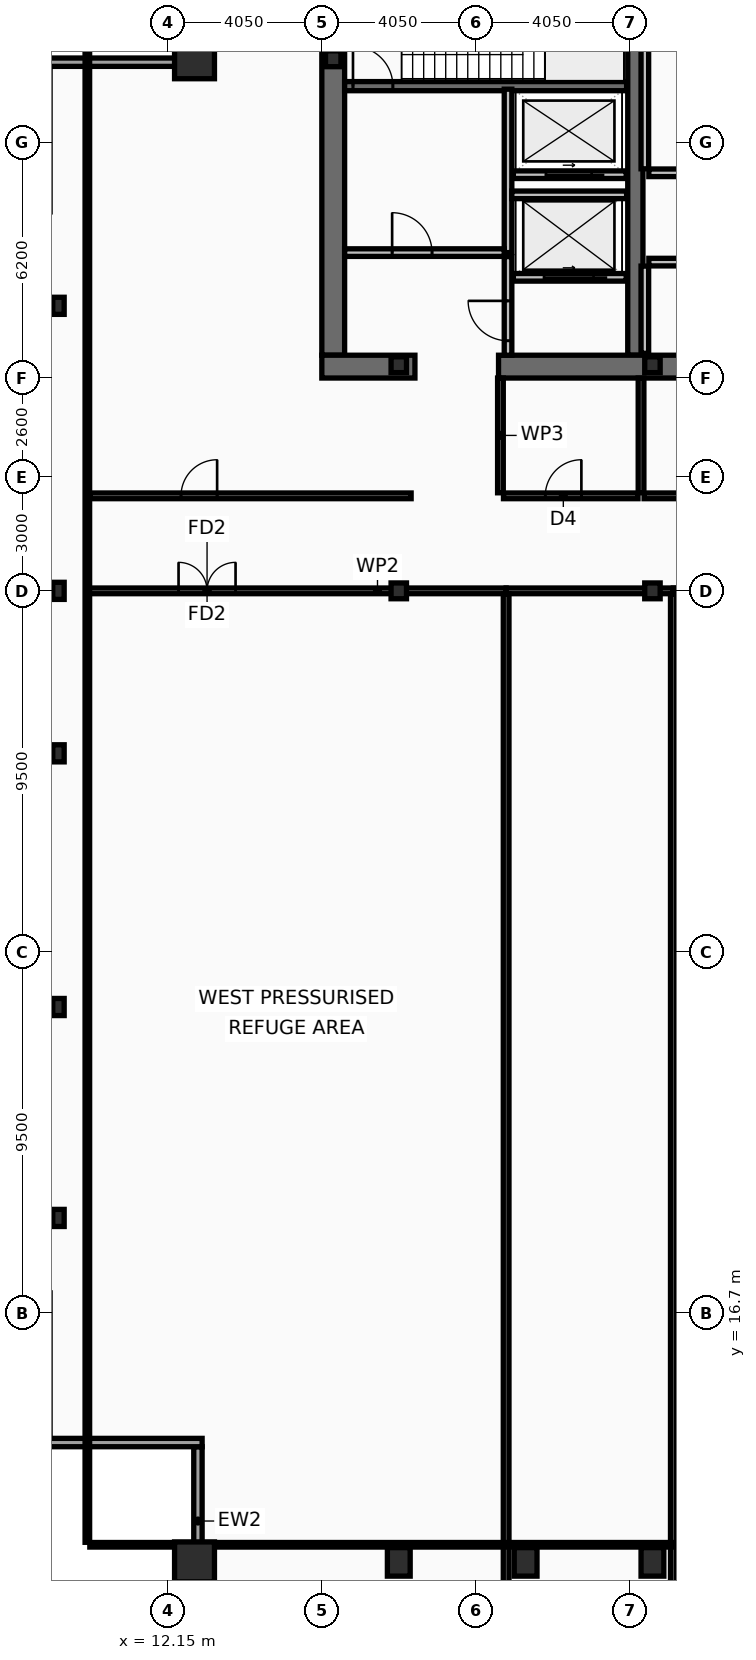
"""IFC4 building model, lengths in metres.
Left out: names, types, materials, properties, quantities, classifications, styles, units other than length and angle.
Written with IfcOpenShell. Run it as: python <this file> out.ifc"""

import sys

from ifc_helpers import new_model, si_unit, direction, frame, frame_2d, origin, origin_2d, place, context, subcontext, project, spatial, rectangle, hollow_rectangle, i_section, extrude, element, fill, save


model = new_model("IFC4")
c1 = context("Model", 3, precision=1e-05, world=origin(), true_north=direction((0.0, 1.0)))
c2 = subcontext(c1, "Body", "Model", "MODEL_VIEW")
j1 = project(units=[si_unit("LENGTHUNIT", "METRE"), si_unit("PLANEANGLEUNIT", "RADIAN")], contexts=[c1])
p1 = place(None, origin())
s1 = spatial("IfcSite", under=j1, at=p1, CompositionType="ELEMENT")
p2 = place(p1, origin())
s2 = spatial("IfcBuilding", under=s1, at=p2, CompositionType="ELEMENT")
p3 = place(p2, frame((0.0, 0.0, 257.0)))
s3 = spatial("IfcBuildingStorey", under=s2, at=p3, CompositionType="ELEMENT", Elevation=257.0)
p4 = place(p3, frame((16.5, 41.9, 0.0), z_axis=(0.0, 0.0, 1.0), x_axis=(0.0, 1.0, 0.0)))
e1 = element("IfcWall", 1, at=p4, inside=s3, PredefinedType="SHEAR", context=c2, shape_type="SweptSolid", body=[
    extrude(rectangle(XDim=11.2, YDim=0.6, at=frame_2d((5.6, 0.0))), origin(), (0.0, 0.0, 1.0), 4.64),
])
p5 = place(p3, frame((24.45, 41.9, 0.0), z_axis=(0.0, 0.0, 1.0), x_axis=(0.0, 1.0, 0.0)))
e2 = element("IfcWall", 2, at=p5, inside=s3, PredefinedType="SHEAR", context=c2, shape_type="SweptSolid", body=[
    extrude(rectangle(XDim=11.2, YDim=0.4, at=frame_2d((5.6, 0.0))), origin(), (0.0, 0.0, 1.0), 4.64),
])
p6 = place(p3, frame((18.65, 41.6, 0.0), z_axis=(0.0, 0.0, 1.0), x_axis=(-1.0, 0.0, 0.0)))
e3 = element("IfcWall", 3, at=p6, inside=s3, PredefinedType="SHEAR", context=c2, shape_type="SweptSolid", body=[
    extrude(rectangle(XDim=2.45, YDim=0.6, at=frame_2d((1.225, 0.0))), origin(), (0.0, 0.0, 1.0), 4.64),
])
p7 = place(p3, frame((32.3, 41.6, 0.0), z_axis=(0.0, 0.0, 1.0), x_axis=(-1.0, 0.0, 0.0)))
e4 = element("IfcWall", 4, at=p7, inside=s3, PredefinedType="SHEAR", context=c2, shape_type="SweptSolid", body=[
    extrude(rectangle(XDim=11.45, YDim=0.6, at=frame_2d((5.725, 0.0))), origin(), (0.0, 0.0, 1.0), 4.64),
])
p8 = place(p3, frame((16.8, 48.98, 0.0), z_axis=(0.0, 0.0, 1.0), x_axis=(1.0, 0.0, 0.0)))
e5 = element("IfcWall", 5, at=p8, inside=s3, PredefinedType="SHEAR", context=c2, shape_type="SweptSolid", body=[
    extrude(rectangle(XDim=7.42, YDim=0.24, at=frame_2d((3.71, 0.0))), origin(), (0.0, 0.0, 1.0), 4.64),
])
p9 = place(p8, frame((0.22, 0.0, 0.0)))
e6 = element("IfcOpeningElement", 6, at=p9, cuts=e5, PredefinedType="OPENING", context=c2, shape_type="SweptSolid", body=[
    extrude(rectangle(XDim=1.05, YDim=2.15, at=frame_2d((0.525, 1.075))), frame((0.0, 0.13, 0.0), z_axis=(0.0, -1.0, 0.0), x_axis=(1.0, 0.0, 0.0)), (0.0, 0.0, 1.0), 0.26),
])
for number, where, z_axis, x_axis in (
    (7, (12.85, 10.15, 0.0), (0.0, 0.0, 1.0), (1.0, 0.0, 0.0)),
    (8, (12.85, 49.7, 0.0), (0.0, 0.0, 1.0), (1.0, 0.0, 0.0)),
):
    element("IfcColumn", number, at=place(p3, frame(where, z_axis=z_axis, x_axis=x_axis)), inside=s3, PredefinedType="COLUMN", context=c2, shape_type="SweptSolid", body=[
        extrude(hollow_rectangle(XDim=1.05, YDim=1.05, WallThickness=0.055, at=origin_2d()), origin(), (0.0, 0.0, 1.0), 4.8),
    ])
for number, where, z_axis, x_axis in (
    (9, (18.225, 10.15, 0.0), (0.0, 0.0, 1.0), (1.0, 0.0, 0.0)),
    (10, (21.562, 10.15, 0.0), (0.0, 0.0, 1.0), (1.0, 0.0, 0.0)),
    (11, (24.9, 10.15, 0.0), (0.0, 0.0, 1.0), (1.0, 0.0, 0.0)),
):
    element("IfcColumn", number, at=place(p3, frame(where, z_axis=z_axis, x_axis=x_axis)), inside=s3, PredefinedType="COLUMN", context=c2, shape_type="SweptSolid", body=[
        extrude(hollow_rectangle(XDim=0.6, YDim=0.75, WallThickness=0.045, at=origin_2d()), origin(), (0.0, 0.0, 1.0), 4.8),
    ])
for number, where, z_axis, x_axis in (
    (12, (9.27, 19.2, 0.0), (0.0, 0.0, 1.0), (1.0, 0.0, 0.0)),
    (13, (9.27, 24.75, 0.0), (0.0, 0.0, 1.0), (1.0, 0.0, 0.0)),
    (14, (9.27, 31.425, 0.0), (0.0, 0.0, 1.0), (1.0, 0.0, 0.0)),
    (15, (9.27, 35.7, 0.0), (0.0, 0.0, 1.0), (1.0, 0.0, 0.0)),
    (16, (9.27, 43.2, 0.0), (0.0, 0.0, 1.0), (1.0, 0.0, 0.0)),
):
    element("IfcColumn", number, at=place(p3, frame(where, z_axis=z_axis, x_axis=x_axis)), inside=s3, PredefinedType="COLUMN", context=c2, shape_type="SweptSolid", body=[
        extrude(i_section(OverallWidth=0.3, OverallDepth=0.45, WebThickness=0.014, FlangeThickness=0.026, at=origin_2d()), origin(), (0.0, 0.0, 1.0), 4.8),
    ])
for number, where, z_axis, x_axis in (
    (17, (16.5, 49.7, 0.0), (0.0, 0.0, 1.0), (1.0, 0.0, 0.0)),
    (18, (18.225, 35.7, 0.0), (0.0, 0.0, 1.0), (1.0, 0.0, 0.0)),
    (19, (18.225, 41.65, 0.0), (0.0, 0.0, 1.0), (1.0, 0.0, 0.0)),
    (20, (24.9, 35.7, 0.0), (0.0, 0.0, 1.0), (1.0, 0.0, 0.0)),
    (21, (24.9, 41.65, 0.0), (0.0, 0.0, 1.0), (1.0, 0.0, 0.0)),
):
    element("IfcColumn", number, at=place(p3, frame(where, z_axis=z_axis, x_axis=x_axis)), inside=s3, PredefinedType="COLUMN", context=c2, shape_type="SweptSolid", body=[
        extrude(i_section(OverallWidth=0.406, OverallDepth=0.416, WebThickness=0.03, FlangeThickness=0.048, at=origin_2d()), origin(), (0.0, 0.0, 1.0), 4.8),
    ])
p10 = place(p3, frame((12.94, 9.27, 0.0), z_axis=(0.0, 0.0, 1.0), x_axis=(0.0, 1.0, 0.0)))
e22 = element("IfcWall", 22, at=p10, inside=s3, PredefinedType="SOLIDWALL", context=c2, shape_type="SweptSolid", body=[
    extrude(rectangle(XDim=3.91, YDim=0.22, at=frame_2d((1.955, 0.0))), origin(), (0.0, 0.0, 1.0), 4.03),
])
for number, where, z_axis, x_axis in (
    (23, (13.05, 13.29, 0.0), (0.0, 0.0, 1.0), (-1.0, 0.0, 0.0)),
    (24, (8.83, 49.61, 0.0), (0.0, 0.0, 1.0), (1.0, 0.0, 0.0)),
):
    element("IfcWall", number, at=place(p3, frame(where, z_axis=z_axis, x_axis=x_axis)), inside=s3, PredefinedType="SOLIDWALL", context=c2, shape_type="SweptSolid", body=[
        extrude(rectangle(XDim=4.22, YDim=0.22, at=frame_2d((2.11, 0.0))), origin(), (0.0, 0.0, 1.0), 4.03),
    ])
p11 = place(p3, frame((12.94, 49.72, 0.0), z_axis=(0.0, 0.0, 1.0), x_axis=(0.0, 1.0, 0.0)))
e25 = element("IfcWall", 25, at=p11, inside=s3, PredefinedType="SOLIDWALL", context=c2, shape_type="SweptSolid", body=[
    extrude(rectangle(XDim=3.91, YDim=0.22, at=frame_2d((1.955, 0.0))), origin(), (0.0, 0.0, 1.0), 4.03),
])
p12 = place(p3, frame((24.21, 43.95, 0.0), z_axis=(0.0, 0.0, 1.0), x_axis=(-1.0, 0.0, 0.0)))
e26 = element("IfcWall", 26, at=p12, inside=s3, PredefinedType="PARTITIONING", context=c2, shape_type="SweptSolid", body=[
    extrude(rectangle(XDim=2.97, YDim=0.2, at=frame_2d((1.485, 0.0))), origin(), (0.0, 0.0, 1.0), 4.64),
])
p13 = place(p12, frame((0.86, 0.0, 0.0)))
e27 = element("IfcOpeningElement", 27, at=p13, cuts=e26, PredefinedType="OPENING", context=c2, shape_type="SweptSolid", body=[
    extrude(rectangle(XDim=1.3, YDim=2.18, at=frame_2d((0.65, 1.09))), frame((0.0, 0.11, 0.0), z_axis=(0.0, -1.0, 0.0), x_axis=(1.0, 0.0, 0.0)), (0.0, 0.0, 1.0), 0.22),
])
p14 = place(p3, frame((24.21, 46.65, 0.0), z_axis=(0.0, 0.0, 1.0), x_axis=(-1.0, 0.0, 0.0)))
e28 = element("IfcWall", 28, at=p14, inside=s3, PredefinedType="PARTITIONING", context=c2, shape_type="SweptSolid", body=[
    extrude(rectangle(XDim=2.97, YDim=0.2, at=frame_2d((1.485, 0.0))), origin(), (0.0, 0.0, 1.0), 4.64),
])
p15 = place(p14, frame((0.91, 0.0, 0.0)))
e29 = element("IfcOpeningElement", 29, at=p15, cuts=e28, PredefinedType="OPENING", context=c2, shape_type="SweptSolid", body=[
    extrude(rectangle(XDim=1.2, YDim=2.18, at=frame_2d((0.6, 1.09))), frame((0.0, 0.11, 0.0), z_axis=(0.0, -1.0, 0.0), x_axis=(1.0, 0.0, 0.0)), (0.0, 0.0, 1.0), 0.22),
])
p16 = place(p3, frame((21.1, 44.6, 0.0), z_axis=(0.0, 0.0, 1.0), x_axis=(0.0, 1.0, 0.0)))
e30 = element("IfcWall", 30, at=p16, inside=s3, PredefinedType="PARTITIONING", context=c2, shape_type="SweptSolid", body=[
    extrude(rectangle(XDim=4.3, YDim=0.2, at=frame_2d((2.15, 0.0))), origin(), (0.0, 0.0, 1.0), 4.64),
])
p17 = place(p3, frame((16.8, 44.6, 0.0), z_axis=(0.0, 0.0, 1.0), x_axis=(1.0, 0.0, 0.0)))
e31 = element("IfcWall", 31, at=p17, inside=s3, PredefinedType="PARTITIONING", context=c2, shape_type="SweptSolid", body=[
    extrude(rectangle(XDim=4.2, YDim=0.2, at=frame_2d((2.1, 0.0))), origin(), (0.0, 0.0, 1.0), 4.64),
])
p18 = place(p17, frame((1.25, 0.0, 0.0)))
e32 = element("IfcOpeningElement", 32, at=p18, cuts=e31, PredefinedType="OPENING", context=c2, shape_type="SweptSolid", body=[
    extrude(rectangle(XDim=1.05, YDim=2.15, at=frame_2d((0.525, 1.075))), frame((0.0, 0.11, 0.0), z_axis=(0.0, -1.0, 0.0), x_axis=(1.0, 0.0, 0.0)), (0.0, 0.0, 1.0), 0.22),
])
p19 = place(p3, frame((21.2, 46.12, 0.0), z_axis=(0.0, 0.0, 1.0), x_axis=(1.0, 0.0, 0.0)))
e33 = element("IfcWall", 33, at=p19, inside=s3, PredefinedType="PARTITIONING", context=c2, shape_type="SweptSolid", body=[
    extrude(rectangle(XDim=3.02, YDim=0.2, at=frame_2d((1.51, 0.0))), origin(), (0.0, 0.0, 1.0), 4.64),
])
p20 = place(p3, frame((21.1, 41.9, 0.0), z_axis=(0.0, 0.0, 1.0), x_axis=(0.0, 1.0, 0.0)))
e34 = element("IfcWall", 34, at=p20, inside=s3, PredefinedType="PARTITIONING", context=c2, shape_type="SweptSolid", body=[
    extrude(rectangle(XDim=2.595, YDim=0.2, at=frame_2d((1.298, 0.0))), origin(), (0.0, 0.0, 1.0), 4.64),
])
p21 = place(p20, frame((0.38, 0.0, 0.0)))
e35 = element("IfcOpeningElement", 35, at=p21, cuts=e34, PredefinedType="OPENING", context=c2, shape_type="SweptSolid", body=[
    extrude(rectangle(XDim=1.05, YDim=2.15, at=frame_2d((0.525, 1.075))), frame((0.0, 0.11, 0.0), z_axis=(0.0, -1.0, 0.0), x_axis=(1.0, 0.0, 0.0)), (0.0, 0.0, 1.0), 0.22),
])
p22 = place(p3, frame((24.7, 46.805, 0.0), z_axis=(0.0, 0.0, 1.0), x_axis=(0.0, 1.0, 0.0)))
e36 = element("IfcWall", 36, at=p22, inside=s3, PredefinedType="PARTITIONING", context=c2, shape_type="SweptSolid", body=[
    extrude(rectangle(XDim=5.99, YDim=0.2, at=frame_2d((2.995, 0.0))), origin(), (0.0, 0.0, 1.0), 4.64),
])
p23 = place(p3, frame((24.805, 46.7, 0.0), z_axis=(0.0, 0.0, 1.0), x_axis=(1.0, 0.0, 0.0)))
e37 = element("IfcWall", 37, at=p23, inside=s3, PredefinedType="PARTITIONING", context=c2, shape_type="SweptSolid", body=[
    extrude(rectangle(XDim=7.51, YDim=0.2, at=frame_2d((3.755, 0.0))), origin(), (0.0, 0.0, 1.0), 4.64),
])
p24 = place(p23, frame((2.4, 0.0, 0.0)))
e38 = element("IfcOpeningElement", 38, at=p24, cuts=e37, PredefinedType="OPENING", context=c2, shape_type="SweptSolid", body=[
    extrude(rectangle(XDim=0.95, YDim=2.1, at=frame_2d((0.475, 1.05))), frame((0.0, 0.11, 0.0), z_axis=(0.0, -1.0, 0.0), x_axis=(1.0, 0.0, 0.0)), (0.0, 0.0, 1.0), 0.22),
])
p25 = place(p3, frame((24.7, 41.95, 0.0), z_axis=(0.0, 0.0, 1.0), x_axis=(0.0, 1.0, 0.0)))
e39 = element("IfcWall", 39, at=p25, inside=s3, PredefinedType="PARTITIONING", context=c2, shape_type="SweptSolid", body=[
    extrude(rectangle(XDim=2.295, YDim=0.2, at=frame_2d((1.147, 0.0))), origin(), (0.0, 0.0, 1.0), 4.64),
])
p26 = place(p3, frame((24.805, 44.35, 0.0), z_axis=(0.0, 0.0, 1.0), x_axis=(1.0, 0.0, 0.0)))
e40 = element("IfcWall", 40, at=p26, inside=s3, PredefinedType="PARTITIONING", context=c2, shape_type="SweptSolid", body=[
    extrude(rectangle(XDim=7.34, YDim=0.2, at=frame_2d((3.67, 0.0))), origin(), (0.0, 0.0, 1.0), 4.64),
])
p27 = place(p26, frame((2.4, 0.0, 0.0)))
e41 = element("IfcOpeningElement", 41, at=p27, cuts=e40, PredefinedType="OPENING", context=c2, shape_type="SweptSolid", body=[
    extrude(rectangle(XDim=0.95, YDim=2.1, at=frame_2d((0.475, 1.05))), frame((0.0, 0.11, 0.0), z_axis=(0.0, -1.0, 0.0), x_axis=(1.0, 0.0, 0.0)), (0.0, 0.0, 1.0), 0.22),
])
p28 = place(p3, frame((10.03, 35.7, 0.0), z_axis=(0.0, 0.0, 1.0), x_axis=(1.0, 0.0, 0.0)))
e42 = element("IfcWall", 42, at=p28, inside=s3, PredefinedType="PARTITIONING", context=c2, shape_type="SweptSolid", body=[
    extrude(rectangle(XDim=11.02, YDim=0.15, at=frame_2d((5.51, 0.0))), origin(), (0.0, 0.0, 1.0), 3.98),
])
p29 = place(p28, frame((2.4, 0.0, 0.0)))
e43 = element("IfcOpeningElement", 43, at=p29, cuts=e42, PredefinedType="OPENING", context=c2, shape_type="SweptSolid", body=[
    extrude(rectangle(XDim=1.5, YDim=2.15, at=frame_2d((0.75, 1.075))), frame((0.0, 0.085, 0.0), z_axis=(0.0, -1.0, 0.0), x_axis=(1.0, 0.0, 0.0)), (0.0, 0.0, 1.0), 0.17),
])
p30 = place(p3, frame((21.05, 35.7, 0.0), z_axis=(0.0, 0.0, 1.0), x_axis=(1.0, 0.0, 0.0)))
e44 = element("IfcWall", 44, at=p30, inside=s3, PredefinedType="PARTITIONING", context=c2, shape_type="SweptSolid", body=[
    extrude(rectangle(XDim=4.4, YDim=0.15, at=frame_2d((2.2, 0.0))), origin(), (0.0, 0.0, 1.0), 3.98),
])
p31 = place(p3, frame((25.45, 35.7, 0.0), z_axis=(0.0, 0.0, 1.0), x_axis=(1.0, 0.0, 0.0)))
e45 = element("IfcWall", 45, at=p31, inside=s3, PredefinedType="PARTITIONING", context=c2, shape_type="SweptSolid", body=[
    extrude(rectangle(XDim=10.97, YDim=0.15, at=frame_2d((5.485, 0.0))), origin(), (0.0, 0.0, 1.0), 3.98),
])
p32 = place(p31, frame((6.8, 0.0, 0.0)))
e46 = element("IfcOpeningElement", 46, at=p32, cuts=e45, PredefinedType="OPENING", context=c2, shape_type="SweptSolid", body=[
    extrude(rectangle(XDim=1.4, YDim=2.15, at=frame_2d((0.7, 1.075))), frame((0.0, 0.085, 0.0), z_axis=(0.0, -1.0, 0.0), x_axis=(1.0, 0.0, 0.0)), (0.0, 0.0, 1.0), 0.17),
])
p33 = place(p3, frame((21.05, 9.32, 0.0), z_axis=(0.0, 0.0, 1.0), x_axis=(0.0, 1.0, 0.0)))
e47 = element("IfcWall", 47, at=p33, inside=s3, PredefinedType="PARTITIONING", context=c2, shape_type="SweptSolid", body=[
    extrude(rectangle(XDim=26.3, YDim=0.15, at=frame_2d((13.15, 0.0))), origin(), (0.0, 0.0, 1.0), 3.83),
])
p34 = place(p3, frame((25.45, 9.32, 0.0), z_axis=(0.0, 0.0, 1.0), x_axis=(0.0, 1.0, 0.0)))
e48 = element("IfcWall", 48, at=p34, inside=s3, PredefinedType="PARTITIONING", context=c2, shape_type="SweptSolid", body=[
    extrude(rectangle(XDim=26.3, YDim=0.15, at=frame_2d((13.15, 0.0))), origin(), (0.0, 0.0, 1.0), 3.98),
])
p35 = place(p3, frame((20.98, 38.2, 0.0), z_axis=(0.0, 0.0, 1.0), x_axis=(1.0, 0.0, 0.0)))
e49 = element("IfcWall", 49, at=p35, inside=s3, PredefinedType="PARTITIONING", context=c2, shape_type="SweptSolid", body=[
    extrude(rectangle(XDim=3.54, YDim=0.15, at=frame_2d((1.77, 0.0))), origin(), (0.0, 0.0, 1.0), 3.98),
])
p36 = place(p35, frame((1.1, 0.0, 0.0)))
e50 = element("IfcOpeningElement", 50, at=p36, cuts=e49, PredefinedType="OPENING", context=c2, shape_type="SweptSolid", body=[
    extrude(rectangle(XDim=0.95, YDim=2.05, at=frame_2d((0.475, 1.025))), frame((0.0, 0.085, 0.0), z_axis=(0.0, -1.0, 0.0), x_axis=(1.0, 0.0, 0.0)), (0.0, 0.0, 1.0), 0.17),
])
p37 = place(p3, frame((24.68, 38.2, 0.0), z_axis=(0.0, 0.0, 1.0), x_axis=(1.0, 0.0, 0.0)))
e51 = element("IfcWall", 51, at=p37, inside=s3, PredefinedType="PARTITIONING", context=c2, shape_type="SweptSolid", body=[
    extrude(rectangle(XDim=7.49, YDim=0.15, at=frame_2d((3.745, 0.0))), origin(), (0.0, 0.0, 1.0), 3.98),
])
p38 = place(p37, frame((2.8, 0.0, 0.0)))
e52 = element("IfcOpeningElement", 52, at=p38, cuts=e51, PredefinedType="OPENING", context=c2, shape_type="SweptSolid", body=[
    extrude(rectangle(XDim=0.95, YDim=2.1, at=frame_2d((0.475, 1.05))), frame((0.0, 0.085, 0.0), z_axis=(0.0, -1.0, 0.0), x_axis=(1.0, 0.0, 0.0)), (0.0, 0.0, 1.0), 0.17),
])
p39 = place(p3, frame((20.9, 38.28, 0.0), z_axis=(0.0, 0.0, 1.0), x_axis=(0.0, 1.0, 0.0)))
e53 = element("IfcWall", 53, at=p39, inside=s3, PredefinedType="PARTITIONING", context=c2, shape_type="SweptSolid", body=[
    extrude(rectangle(XDim=3.02, YDim=0.15, at=frame_2d((1.51, 0.0))), origin(), (0.0, 0.0, 1.0), 4.64),
])
p40 = place(p3, frame((24.6, 38.28, 0.0), z_axis=(0.0, 0.0, 1.0), x_axis=(0.0, 1.0, 0.0)))
e54 = element("IfcWall", 54, at=p40, inside=s3, PredefinedType="PARTITIONING", context=c2, shape_type="SweptSolid", body=[
    extrude(rectangle(XDim=3.02, YDim=0.15, at=frame_2d((1.51, 0.0))), origin(), (0.0, 0.0, 1.0), 3.98),
])
p41 = place(p3, frame((10.095, 38.2, 0.0), z_axis=(0.0, 0.0, 1.0), x_axis=(1.0, 0.0, 0.0)))
e55 = element("IfcWall", 55, at=p41, inside=s3, PredefinedType="PARTITIONING", context=c2, shape_type="SweptSolid", body=[
    extrude(rectangle(XDim=8.455, YDim=0.15, at=frame_2d((4.228, 0.0))), origin(), (0.0, 0.0, 1.0), 3.98),
])
p42 = place(p41, frame((2.4, 0.0, 0.0)))
e56 = element("IfcOpeningElement", 56, at=p42, cuts=e55, PredefinedType="OPENING", context=c2, shape_type="SweptSolid", body=[
    extrude(rectangle(XDim=0.95, YDim=2.1, at=frame_2d((0.475, 1.05))), frame((0.0, 0.085, 0.0), z_axis=(0.0, -1.0, 0.0), x_axis=(1.0, 0.0, 0.0)), (0.0, 0.0, 1.0), 0.17),
])
p43 = place(p3, frame((10.03, 10.665, 0.0), z_axis=(0.0, 0.0, 1.0), x_axis=(0.0, 1.0, 0.0)))
e57 = element("IfcWall", 57, at=p43, inside=s3, PredefinedType="PARTITIONING", context=c2, shape_type="SweptSolid", body=[
    extrude(rectangle(XDim=42.11, YDim=0.12, at=frame_2d((21.055, 0.0))), origin(), (0.0, 0.0, 1.0), 3.98),
])
p44 = place(p3, frame((10.095, 10.6, 0.0), z_axis=(0.0, 0.0, 1.0), x_axis=(1.0, 0.0, 0.0)))
e58 = element("IfcWall", 58, at=p44, inside=s3, PredefinedType="PARTITIONING", context=c2, shape_type="SweptSolid", body=[
    extrude(rectangle(XDim=52.71, YDim=0.12, at=frame_2d((26.355, 0.0))), origin(), (0.0, 0.0, 1.0), 3.98),
])
p45 = place(p9, origin())
e59 = element("IfcDoor", 59, at=p45, inside=s3, OperationType="SINGLE_SWING_LEFT", PredefinedType="DOOR", context=c2, shape_type="SweptSolid", body=[
    extrude(rectangle(XDim=1.05, YDim=2.15, at=frame_2d((0.525, 1.075))), frame((0.0, 0.025, 0.0), z_axis=(0.0, -1.0, 0.0), x_axis=(1.0, 0.0, 0.0)), (0.0, 0.0, 1.0), 0.05),
])
fill(e6, e59)
p46 = place(p13, origin())
e60 = element("IfcDoor", 60, at=p46, inside=s3, OperationType="SLIDING_TO_LEFT", PredefinedType="DOOR", context=c2, shape_type="SweptSolid", body=[
    extrude(rectangle(XDim=1.3, YDim=2.18, at=frame_2d((0.65, 1.09))), frame((0.0, 0.025, 0.0), z_axis=(0.0, -1.0, 0.0), x_axis=(1.0, 0.0, 0.0)), (0.0, 0.0, 1.0), 0.05),
])
fill(e27, e60)
p47 = place(p15, origin())
e61 = element("IfcDoor", 61, at=p47, inside=s3, OperationType="SLIDING_TO_LEFT", PredefinedType="DOOR", context=c2, shape_type="SweptSolid", body=[
    extrude(rectangle(XDim=1.2, YDim=2.18, at=frame_2d((0.6, 1.09))), frame((0.0, 0.025, 0.0), z_axis=(0.0, -1.0, 0.0), x_axis=(1.0, 0.0, 0.0)), (0.0, 0.0, 1.0), 0.05),
])
fill(e29, e61)
p48 = place(p18, origin())
e62 = element("IfcDoor", 62, at=p48, inside=s3, OperationType="SINGLE_SWING_LEFT", PredefinedType="DOOR", context=c2, shape_type="SweptSolid", body=[
    extrude(rectangle(XDim=1.05, YDim=2.15, at=frame_2d((0.525, 1.075))), frame((0.0, 0.025, 0.0), z_axis=(0.0, -1.0, 0.0), x_axis=(1.0, 0.0, 0.0)), (0.0, 0.0, 1.0), 0.05),
])
fill(e32, e62)
p49 = place(p21, origin())
e63 = element("IfcDoor", 63, at=p49, inside=s3, OperationType="SINGLE_SWING_RIGHT", PredefinedType="DOOR", context=c2, shape_type="SweptSolid", body=[
    extrude(rectangle(XDim=1.05, YDim=2.15, at=frame_2d((0.525, 1.075))), frame((0.0, 0.025, 0.0), z_axis=(0.0, -1.0, 0.0), x_axis=(1.0, 0.0, 0.0)), (0.0, 0.0, 1.0), 0.05),
])
fill(e35, e63)
p50 = place(p29, origin())
e64 = element("IfcDoor", 64, at=p50, inside=s3, OperationType="DOUBLE_DOOR_SINGLE_SWING", PredefinedType="DOOR", context=c2, shape_type="SweptSolid", body=[
    extrude(rectangle(XDim=1.5, YDim=2.15, at=frame_2d((0.75, 1.075))), frame((0.0, 0.025, 0.0), z_axis=(0.0, -1.0, 0.0), x_axis=(1.0, 0.0, 0.0)), (0.0, 0.0, 1.0), 0.05),
])
fill(e43, e64)
p51 = place(p36, origin())
e65 = element("IfcDoor", 65, at=p51, inside=s3, OperationType="SINGLE_SWING_RIGHT", PredefinedType="DOOR", context=c2, shape_type="SweptSolid", body=[
    extrude(rectangle(XDim=0.95, YDim=2.05, at=frame_2d((0.475, 1.025))), frame((0.0, 0.025, 0.0), z_axis=(0.0, -1.0, 0.0), x_axis=(1.0, 0.0, 0.0)), (0.0, 0.0, 1.0), 0.05),
])
fill(e50, e65)
p52 = place(p42, origin())
e66 = element("IfcDoor", 66, at=p52, inside=s3, OperationType="SINGLE_SWING_RIGHT", PredefinedType="DOOR", context=c2, shape_type="SweptSolid", body=[
    extrude(rectangle(XDim=0.95, YDim=2.1, at=frame_2d((0.475, 1.05))), frame((0.0, 0.025, 0.0), z_axis=(0.0, -1.0, 0.0), x_axis=(1.0, 0.0, 0.0)), (0.0, 0.0, 1.0), 0.05),
])
fill(e56, e66)
save(model, sys.argv[1])
